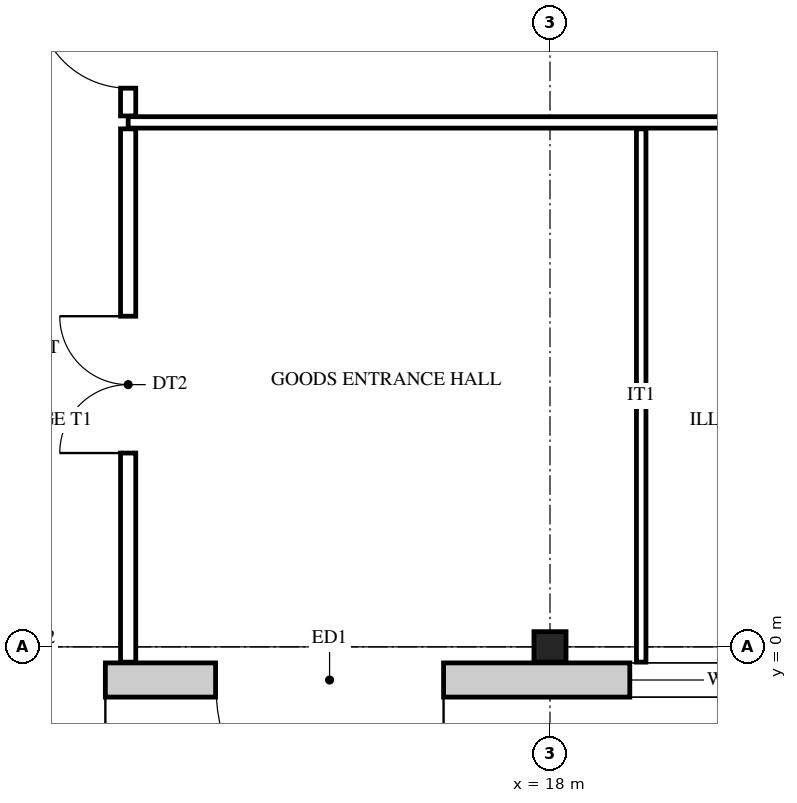
"""IFC4 building model, lengths in metres.
Left out: names, types, materials, properties, quantities, classifications, styles, units other than length and angle.
Written with IfcOpenShell. Run it as: python <this file> out.ifc"""

import sys

from ifc_helpers import new_model, si_unit, direction, frame, frame_2d, origin, origin_2d, place, context, subcontext, project, spatial, rectangle, i_section, extrude, element, fill, save


model = new_model("IFC4")
c1 = context("Model", 3, precision=1e-05, world=origin(), true_north=direction((0.0, 1.0)))
c2 = subcontext(c1, "Body", "Model", "MODEL_VIEW")
j1 = project(units=[si_unit("LENGTHUNIT", "METRE"), si_unit("PLANEANGLEUNIT", "RADIAN")], contexts=[c1])
p1 = place(None, origin())
s1 = spatial("IfcSite", under=j1, at=p1, CompositionType="ELEMENT")
p2 = place(p1, origin())
s2 = spatial("IfcBuilding", under=s1, at=p2, CompositionType="ELEMENT")
p3 = place(p2, origin())
s3 = spatial("IfcBuildingStorey", under=s2, at=p3, CompositionType="ELEMENT", Elevation=0.0)
p4 = place(p3, frame((18.0, 0.0, 0.0), z_axis=(0.0, 0.0, 1.0), x_axis=(0.0, 1.0, 0.0)))
e1 = element("IfcColumn", 1, at=p4, inside=s3, PredefinedType="COLUMN", context=c2, shape_type="SweptSolid", body=[
    extrude(i_section(OverallWidth=0.4, OverallDepth=0.422, WebThickness=0.028, FlangeThickness=0.036, at=origin_2d()), origin(), (0.0, 0.0, 1.0), 6.0),
])
p5 = place(p3, frame((32.15, -0.436, 0.0), z_axis=(0.0, 0.0, 1.0), x_axis=(-1.0, 0.0, 0.0)))
e2 = element("IfcWall", 2, at=p5, inside=s3, PredefinedType="STANDARD", context=c2, shape_type="SweptSolid", body=[
    extrude(rectangle(XDim=32.8, YDim=0.45, at=frame_2d((16.4, 0.0))), origin(), (0.0, 0.0, 1.0), 6.0),
])
p6 = place(p5, frame((15.55, 0.0, 0.012)))
e3 = element("IfcOpeningElement", 3, at=p6, cuts=e2, PredefinedType="OPENING", context=c2, shape_type="SweptSolid", body=[
    extrude(rectangle(XDim=3.0, YDim=2.4, at=frame_2d((1.5, 1.2))), frame((0.0, 0.235, 0.0), z_axis=(0.0, -1.0, 0.0), x_axis=(1.0, 0.0, 0.0)), (0.0, 0.0, 1.0), 0.47),
])
p7 = place(p5, frame((20.0, 0.0, 0.012)))
e4 = element("IfcOpeningElement", 4, at=p7, cuts=e2, PredefinedType="OPENING", context=c2, shape_type="SweptSolid", body=[
    extrude(rectangle(XDim=1.8, YDim=2.4, at=frame_2d((0.9, 1.2))), frame((0.0, 0.235, 0.0), z_axis=(0.0, -1.0, 0.0), x_axis=(1.0, 0.0, 0.0)), (0.0, 0.0, 1.0), 0.47),
])
p8 = place(p5, frame((6.5, 0.0, 0.012)))
e5 = element("IfcOpeningElement", 5, at=p8, cuts=e2, PredefinedType="OPENING", context=c2, shape_type="SweptSolid", body=[
    extrude(rectangle(XDim=1.8, YDim=2.4, at=frame_2d((0.9, 1.2))), frame((0.0, 0.235, 0.0), z_axis=(0.0, -1.0, 0.0), x_axis=(1.0, 0.0, 0.0)), (0.0, 0.0, 1.0), 0.47),
])
p9 = place(p5, frame((28.7, 0.0, 0.9)))
e6 = element("IfcOpeningElement", 6, at=p9, cuts=e2, PredefinedType="OPENING", context=c2, shape_type="SweptSolid", body=[
    extrude(rectangle(XDim=2.4, YDim=3.5, at=frame_2d((1.2, 1.75))), frame((0.0, 0.235, 0.0), z_axis=(0.0, -1.0, 0.0), x_axis=(1.0, 0.0, 0.0)), (0.0, 0.0, 1.0), 0.47),
])
p10 = place(p5, frame((24.2, 0.0, 0.9)))
e7 = element("IfcOpeningElement", 7, at=p10, cuts=e2, PredefinedType="OPENING", context=c2, shape_type="SweptSolid", body=[
    extrude(rectangle(XDim=2.4, YDim=3.5, at=frame_2d((1.2, 1.75))), frame((0.0, 0.235, 0.0), z_axis=(0.0, -1.0, 0.0), x_axis=(1.0, 0.0, 0.0)), (0.0, 0.0, 1.0), 0.47),
])
p11 = place(p5, frame((10.7, 0.0, 0.9)))
e8 = element("IfcOpeningElement", 8, at=p11, cuts=e2, PredefinedType="OPENING", context=c2, shape_type="SweptSolid", body=[
    extrude(rectangle(XDim=2.4, YDim=3.5, at=frame_2d((1.2, 1.75))), frame((0.0, 0.235, 0.0), z_axis=(0.0, -1.0, 0.0), x_axis=(1.0, 0.0, 0.0)), (0.0, 0.0, 1.0), 0.47),
])
p12 = place(p5, frame((1.7, 0.0, 0.9)))
e9 = element("IfcOpeningElement", 9, at=p12, cuts=e2, PredefinedType="OPENING", context=c2, shape_type="SweptSolid", body=[
    extrude(rectangle(XDim=2.4, YDim=3.5, at=frame_2d((1.2, 1.75))), frame((0.0, 0.235, 0.0), z_axis=(0.0, -1.0, 0.0), x_axis=(1.0, 0.0, 0.0)), (0.0, 0.0, 1.0), 0.47),
])
p13 = place(p3, frame((12.45, -0.201, 0.0), z_axis=(0.0, 0.0, 1.0), x_axis=(0.0, 1.0, 0.0)))
e10 = element("IfcWall", 10, at=p13, inside=s3, PredefinedType="PARTITIONING", context=c2, shape_type="SweptSolid", body=[
    extrude(rectangle(XDim=7.016, YDim=0.2, at=frame_2d((3.508, 0.0))), origin(), (0.0, 0.0, 1.0), 5.218),
])
p14 = place(p13, frame((2.751, 0.0, 0.0)))
e11 = element("IfcOpeningElement", 11, at=p14, cuts=e10, PredefinedType="OPENING", context=c2, shape_type="SweptSolid", body=[
    extrude(rectangle(XDim=1.8, YDim=2.1, at=frame_2d((0.9, 1.05))), frame((0.0, 0.11, 0.0), z_axis=(0.0, -1.0, 0.0), x_axis=(1.0, 0.0, 0.0)), (0.0, 0.0, 1.0), 0.22),
])
p15 = place(p3, frame((12.45, 6.985, 0.0), z_axis=(0.0, 0.0, 1.0), x_axis=(0.0, 1.0, 0.0)))
e12 = element("IfcWall", 12, at=p15, inside=s3, PredefinedType="PARTITIONING", context=c2, shape_type="SweptSolid", body=[
    extrude(rectangle(XDim=1.855, YDim=0.2, at=frame_2d((0.927, 0.0))), origin(), (0.0, 0.0, 1.0), 5.218),
])
p16 = place(p15, frame((0.365, 0.0, 0.0)))
e13 = element("IfcOpeningElement", 13, at=p16, cuts=e12, PredefinedType="OPENING", context=c2, shape_type="SweptSolid", body=[
    extrude(rectangle(XDim=1.2, YDim=2.1, at=frame_2d((0.6, 1.05))), frame((0.0, 0.11, 0.0), z_axis=(0.0, -1.0, 0.0), x_axis=(1.0, 0.0, 0.0)), (0.0, 0.0, 1.0), 0.22),
])
p17 = place(p3, frame((19.2, -0.201, 0.0), z_axis=(0.0, 0.0, 1.0), x_axis=(0.0, 1.0, 0.0)))
e14 = element("IfcWall", 14, at=p17, inside=s3, PredefinedType="PARTITIONING", context=c2, shape_type="SweptSolid", body=[
    extrude(rectangle(XDim=7.016, YDim=0.125, at=frame_2d((3.508, 0.0))), origin(), (0.0, 0.0, 1.0), 5.218),
])
p18 = place(p3, frame((12.45, 6.9, 0.0), z_axis=(0.0, 0.0, 1.0), x_axis=(1.0, 0.0, 0.0)))
e15 = element("IfcWall", 15, at=p18, inside=s3, PredefinedType="PARTITIONING", context=c2, shape_type="SweptSolid", body=[
    extrude(rectangle(XDim=11.1, YDim=0.15, at=frame_2d((5.55, 0.0))), origin(), (0.0, 0.0, 1.0), 5.218),
])
p19 = place(p6, origin())
e16 = element("IfcDoor", 16, at=p19, inside=s3, OperationType="DOUBLE_DOOR_DOUBLE_SWING", PredefinedType="DOOR", context=c2, shape_type="SweptSolid", body=[
    extrude(rectangle(XDim=3.0, YDim=2.4, at=frame_2d((1.5, 1.2))), frame((0.0, 0.025, 0.0), z_axis=(0.0, -1.0, 0.0), x_axis=(1.0, 0.0, 0.0)), (0.0, 0.0, 1.0), 0.05),
])
fill(e3, e16)
p20 = place(p7, origin())
e17 = element("IfcDoor", 17, at=p20, inside=s3, OperationType="DOUBLE_DOOR_DOUBLE_SWING", PredefinedType="DOOR", context=c2, shape_type="SweptSolid", body=[
    extrude(rectangle(XDim=1.8, YDim=2.4, at=frame_2d((0.9, 1.2))), frame((0.0, 0.025, 0.0), z_axis=(0.0, -1.0, 0.0), x_axis=(1.0, 0.0, 0.0)), (0.0, 0.0, 1.0), 0.05),
])
fill(e4, e17)
p21 = place(p11, origin())
e18 = element("IfcWindow", 18, at=p21, inside=s3, PartitioningType="SINGLE_PANEL", PredefinedType="WINDOW", context=c2, shape_type="SweptSolid", body=[
    extrude(rectangle(XDim=2.4, YDim=3.5, at=frame_2d((1.2, 1.75))), frame((0.0, 0.03, 0.0), z_axis=(0.0, -1.0, 0.0), x_axis=(1.0, 0.0, 0.0)), (0.0, 0.0, 1.0), 0.06),
])
fill(e8, e18)
p22 = place(p16, origin())
e19 = element("IfcDoor", 19, at=p22, inside=s3, OperationType="SINGLE_SWING_RIGHT", PredefinedType="DOOR", context=c2, shape_type="SweptSolid", body=[
    extrude(rectangle(XDim=1.2, YDim=2.1, at=frame_2d((0.6, 1.05))), frame((0.0, 0.025, 0.0), z_axis=(0.0, -1.0, 0.0), x_axis=(1.0, 0.0, 0.0)), (0.0, 0.0, 1.0), 0.05),
])
fill(e13, e19)
p23 = place(p14, frame((1.8, 0.0, 0.0), z_axis=(0.0, 0.0, 1.0), x_axis=(-1.0, 0.0, 0.0)))
e20 = element("IfcDoor", 20, at=p23, inside=s3, OperationType="DOUBLE_DOOR_SINGLE_SWING", PredefinedType="DOOR", context=c2, shape_type="SweptSolid", body=[
    extrude(rectangle(XDim=1.8, YDim=2.1, at=frame_2d((0.9, 1.05))), frame((0.0, 0.025, 0.0), z_axis=(0.0, -1.0, 0.0), x_axis=(1.0, 0.0, 0.0)), (0.0, 0.0, 1.0), 0.05),
])
fill(e11, e20)
save(model, sys.argv[1])
